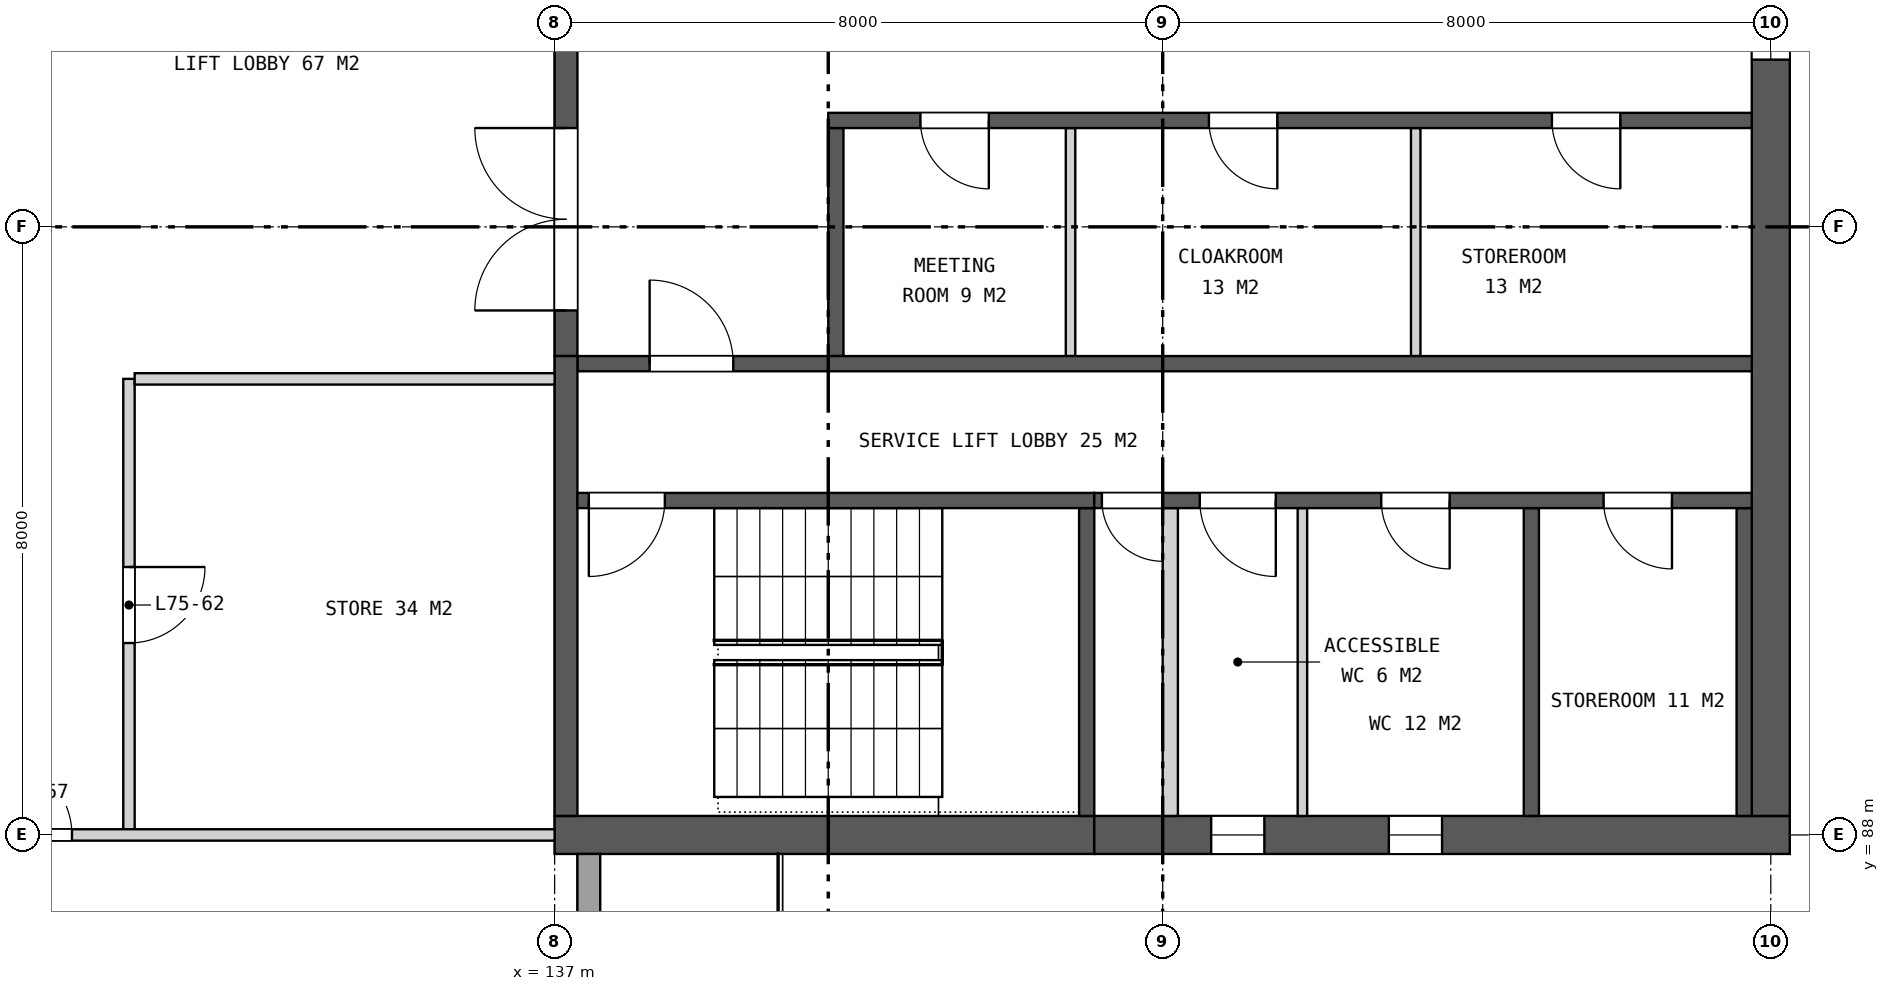
"""IFC4 building model, lengths in metres.
Left out: names, types, materials, properties, quantities, classifications, styles, units other than length and angle.
Written with IfcOpenShell. Run it as: python <this file> out.ifc"""

import sys

from ifc_helpers import new_model, si_unit, direction, frame, frame_2d, origin, place, context, subcontext, project, spatial, rectangle, extrude, element, fill, save


model = new_model("IFC4")
c1 = context("Model", 3, precision=1e-05, world=origin(), true_north=direction((0.0, 1.0)))
c2 = subcontext(c1, "Body", "Model", "MODEL_VIEW")
j1 = project(units=[si_unit("LENGTHUNIT", "METRE"), si_unit("PLANEANGLEUNIT", "RADIAN")], contexts=[c1])
p1 = place(None, origin())
s1 = spatial("IfcSite", under=j1, at=p1, CompositionType="ELEMENT")
p2 = place(p1, origin())
s2 = spatial("IfcBuilding", under=s1, at=p2, CompositionType="ELEMENT")
p3 = place(p2, frame((0.0, 0.0, 344.9)))
s3 = spatial("IfcBuildingStorey", under=s2, at=p3, CompositionType="ELEMENT", Elevation=344.9)
p4 = place(p3, frame((137.0, 88.0, 0.0), z_axis=(0.0, 0.0, 1.0), x_axis=(1.0, 0.0, 0.0)))
e1 = element("IfcWall", 1, at=p4, inside=s3, PredefinedType="SHEAR", context=c2, shape_type="SweptSolid", body=[
    extrude(rectangle(XDim=7.1, YDim=0.5, at=frame_2d((3.55, 0.0))), origin(), (0.0, 0.0, 1.0), 4.2),
])
p5 = place(p3, frame((144.1, 88.0, 0.0), z_axis=(0.0, 0.0, 1.0), x_axis=(1.0, 0.0, 0.0)))
e2 = element("IfcWall", 2, at=p5, inside=s3, PredefinedType="SHEAR", context=c2, shape_type="SweptSolid", body=[
    extrude(rectangle(XDim=9.15, YDim=0.5, at=frame_2d((4.575, 0.0))), origin(), (0.0, 0.0, 1.0), 4.2),
])
p6 = place(p5, frame((1.538, 0.0, 1.5)))
e3 = element("IfcOpeningElement", 3, at=p6, cuts=e2, PredefinedType="OPENING", context=c2, shape_type="SweptSolid", body=[
    extrude(rectangle(XDim=0.7, YDim=0.9, at=frame_2d((0.35, 0.45))), frame((0.0, 0.26, 0.0), z_axis=(0.0, -1.0, 0.0), x_axis=(1.0, 0.0, 0.0)), (0.0, 0.0, 1.0), 0.52),
])
p7 = place(p5, frame((3.875, 0.0, 1.5)))
e4 = element("IfcOpeningElement", 4, at=p7, cuts=e2, PredefinedType="OPENING", context=c2, shape_type="SweptSolid", body=[
    extrude(rectangle(XDim=0.7, YDim=0.9, at=frame_2d((0.35, 0.45))), frame((0.0, 0.26, 0.0), z_axis=(0.0, -1.0, 0.0), x_axis=(1.0, 0.0, 0.0)), (0.0, 0.0, 1.0), 0.52),
])
p8 = place(p3, frame((153.0, 88.25, 0.0), z_axis=(0.0, 0.0, 1.0), x_axis=(0.0, 1.0, 0.0)))
e5 = element("IfcWall", 5, at=p8, inside=s3, PredefinedType="SHEAR", context=c2, shape_type="SweptSolid", body=[
    extrude(rectangle(XDim=23.5, YDim=0.5, at=frame_2d((11.75, 0.0))), origin(), (0.0, 0.0, 1.0), 4.2),
])
p9 = place(p8, frame((9.95, 0.0, 0.15)))
e6 = element("IfcOpeningElement", 6, at=p9, cuts=e5, PredefinedType="OPENING", context=c2, shape_type="SweptSolid", body=[
    extrude(rectangle(XDim=3.6, YDim=3.0, at=frame_2d((1.8, 1.5))), frame((0.0, 0.26, 0.0), z_axis=(0.0, -1.0, 0.0), x_axis=(1.0, 0.0, 0.0)), (0.0, 0.0, 1.0), 0.52),
])
p10 = place(p3, frame((137.15, 94.3, 0.0), z_axis=(0.0, 0.0, 1.0), x_axis=(0.0, 1.0, 0.0)))
e7 = element("IfcWall", 7, at=p10, inside=s3, PredefinedType="SHEAR", context=c2, shape_type="SweptSolid", body=[
    extrude(rectangle(XDim=11.4, YDim=0.3, at=frame_2d((5.7, 0.0))), origin(), (0.0, 0.0, 1.0), 4.2),
])
p11 = place(p10, frame((0.6, 0.0, 0.0)))
e8 = element("IfcOpeningElement", 8, at=p11, cuts=e7, PredefinedType="OPENING", context=c2, shape_type="SweptSolid", body=[
    extrude(rectangle(XDim=2.4, YDim=2.4, at=frame_2d((1.2, 1.2))), frame((0.0, 0.16, 0.0), z_axis=(0.0, -1.0, 0.0), x_axis=(1.0, 0.0, 0.0)), (0.0, 0.0, 1.0), 0.32),
])
p12 = place(p10, frame((4.5, 0.0, 0.0)))
e9 = element("IfcOpeningElement", 9, at=p12, cuts=e7, PredefinedType="OPENING", context=c2, shape_type="SweptSolid", body=[
    extrude(rectangle(XDim=2.4, YDim=2.4, at=frame_2d((1.2, 1.2))), frame((0.0, 0.16, 0.0), z_axis=(0.0, -1.0, 0.0), x_axis=(1.0, 0.0, 0.0)), (0.0, 0.0, 1.0), 0.32),
])
p13 = place(p10, frame((8.4, 0.0, 0.0)))
e10 = element("IfcOpeningElement", 10, at=p13, cuts=e7, PredefinedType="OPENING", context=c2, shape_type="SweptSolid", body=[
    extrude(rectangle(XDim=2.4, YDim=2.4, at=frame_2d((1.2, 1.2))), frame((0.0, 0.16, 0.0), z_axis=(0.0, -1.0, 0.0), x_axis=(1.0, 0.0, 0.0)), (0.0, 0.0, 1.0), 0.32),
])
p14 = place(p3, frame((140.7, 94.3, 0.0), z_axis=(0.0, 0.0, 1.0), x_axis=(0.0, 1.0, 0.0)))
e11 = element("IfcWall", 11, at=p14, inside=s3, PredefinedType="SHEAR", context=c2, shape_type="SweptSolid", body=[
    extrude(rectangle(XDim=3.0, YDim=0.2, at=frame_2d((1.5, 0.0))), origin(), (0.0, 0.0, 1.0), 4.2),
])
for number, where, z_axis, x_axis in (
    (12, (143.788, 94.3, 0.0), (0.0, 0.0, 1.0), (0.0, 1.0, 0.0)),
    (13, (148.329, 94.3, 0.0), (0.0, 0.0, 1.0), (0.0, 1.0, 0.0)),
):
    element("IfcWall", number, at=place(p3, frame(where, z_axis=z_axis, x_axis=x_axis)), inside=s3, PredefinedType="PARTITIONING", context=c2, shape_type="SweptSolid", body=[
        extrude(rectangle(XDim=3.0, YDim=0.125, at=frame_2d((1.5, 0.0))), origin(), (0.0, 0.0, 1.0), 4.2),
    ])
p15 = place(p3, frame((140.6, 97.4, 0.0), z_axis=(0.0, 0.0, 1.0), x_axis=(1.0, 0.0, 0.0)))
e14 = element("IfcWall", 14, at=p15, inside=s3, PredefinedType="SHEAR", context=c2, shape_type="SweptSolid", body=[
    extrude(rectangle(XDim=12.15, YDim=0.2, at=frame_2d((6.075, 0.0))), origin(), (0.0, 0.0, 1.0), 4.2),
])
p16 = place(p15, frame((1.212, 0.0, 0.0)))
e15 = element("IfcOpeningElement", 15, at=p16, cuts=e14, PredefinedType="OPENING", context=c2, shape_type="SweptSolid", body=[
    extrude(rectangle(XDim=0.9, YDim=2.1, at=frame_2d((0.45, 1.05))), frame((0.0, 0.11, 0.0), z_axis=(0.0, -1.0, 0.0), x_axis=(1.0, 0.0, 0.0)), (0.0, 0.0, 1.0), 0.22),
])
p17 = place(p15, frame((5.008, 0.0, 0.0)))
e16 = element("IfcOpeningElement", 16, at=p17, cuts=e14, PredefinedType="OPENING", context=c2, shape_type="SweptSolid", body=[
    extrude(rectangle(XDim=0.9, YDim=2.1, at=frame_2d((0.45, 1.05))), frame((0.0, 0.11, 0.0), z_axis=(0.0, -1.0, 0.0), x_axis=(1.0, 0.0, 0.0)), (0.0, 0.0, 1.0), 0.22),
])
p18 = place(p15, frame((9.521, 0.0, 0.0)))
e17 = element("IfcOpeningElement", 17, at=p18, cuts=e14, PredefinedType="OPENING", context=c2, shape_type="SweptSolid", body=[
    extrude(rectangle(XDim=0.9, YDim=2.1, at=frame_2d((0.45, 1.05))), frame((0.0, 0.11, 0.0), z_axis=(0.0, -1.0, 0.0), x_axis=(1.0, 0.0, 0.0)), (0.0, 0.0, 1.0), 0.22),
])
p19 = place(p3, frame((137.3, 94.2, 0.0), z_axis=(0.0, 0.0, 1.0), x_axis=(1.0, 0.0, 0.0)))
e18 = element("IfcWall", 18, at=p19, inside=s3, PredefinedType="SHEAR", context=c2, shape_type="SweptSolid", body=[
    extrude(rectangle(XDim=15.45, YDim=0.2, at=frame_2d((7.725, 0.0))), origin(), (0.0, 0.0, 1.0), 4.2),
])
p20 = place(p19, frame((0.95, 0.0, 0.0)))
e19 = element("IfcOpeningElement", 19, at=p20, cuts=e18, PredefinedType="OPENING", context=c2, shape_type="SweptSolid", body=[
    extrude(rectangle(XDim=1.1, YDim=2.1, at=frame_2d((0.55, 1.05))), frame((0.0, 0.11, 0.0), z_axis=(0.0, -1.0, 0.0), x_axis=(1.0, 0.0, 0.0)), (0.0, 0.0, 1.0), 0.22),
])
p21 = place(p3, frame((137.15, 88.25, 0.0), z_axis=(0.0, 0.0, 1.0), x_axis=(0.0, 1.0, 0.0)))
e20 = element("IfcWall", 20, at=p21, inside=s3, PredefinedType="SHEAR", context=c2, shape_type="SweptSolid", body=[
    extrude(rectangle(XDim=6.05, YDim=0.3, at=frame_2d((3.025, 0.0))), origin(), (0.0, 0.0, 1.0), 4.2),
])
for number, where, z_axis, x_axis in (
    (21, (144.0, 88.25, 0.0), (0.0, 0.0, 1.0), (0.0, 1.0, 0.0)),
    (22, (149.85, 88.25, 0.0), (0.0, 0.0, 1.0), (0.0, 1.0, 0.0)),
    (23, (152.65, 88.25, 0.0), (0.0, 0.0, 1.0), (0.0, 1.0, 0.0)),
):
    element("IfcWall", number, at=place(p3, frame(where, z_axis=z_axis, x_axis=x_axis)), inside=s3, PredefinedType="SHEAR", context=c2, shape_type="SweptSolid", body=[
        extrude(rectangle(XDim=4.05, YDim=0.2, at=frame_2d((2.025, 0.0))), origin(), (0.0, 0.0, 1.0), 4.2),
    ])
p22 = place(p3, frame((145.1, 88.25, 0.0), z_axis=(0.0, 0.0, 1.0), x_axis=(0.0, 1.0, 0.0)))
e24 = element("IfcWall", 24, at=p22, inside=s3, PredefinedType="PARTITIONING", context=c2, shape_type="SweptSolid", body=[
    extrude(rectangle(XDim=4.05, YDim=0.2, at=frame_2d((2.025, 0.0))), origin(), (0.0, 0.0, 1.0), 4.2),
])
p23 = place(p3, frame((146.838, 88.25, 0.0), z_axis=(0.0, 0.0, 1.0), x_axis=(0.0, 1.0, 0.0)))
e25 = element("IfcWall", 25, at=p23, inside=s3, PredefinedType="PARTITIONING", context=c2, shape_type="SweptSolid", body=[
    extrude(rectangle(XDim=4.05, YDim=0.125, at=frame_2d((2.025, 0.0))), origin(), (0.0, 0.0, 1.0), 4.2),
])
p24 = place(p3, frame((137.3, 92.4, 0.0), z_axis=(0.0, 0.0, 1.0), x_axis=(1.0, 0.0, 0.0)))
e26 = element("IfcWall", 26, at=p24, inside=s3, PredefinedType="SHEAR", context=c2, shape_type="SweptSolid", body=[
    extrude(rectangle(XDim=6.8, YDim=0.2, at=frame_2d((3.4, 0.0))), origin(), (0.0, 0.0, 1.0), 4.2),
])
p25 = place(p24, frame((0.15, 0.0, 0.0)))
e27 = element("IfcOpeningElement", 27, at=p25, cuts=e26, PredefinedType="OPENING", context=c2, shape_type="SweptSolid", body=[
    extrude(rectangle(XDim=1.0, YDim=2.1, at=frame_2d((0.5, 1.05))), frame((0.0, 0.11, 0.0), z_axis=(0.0, -1.0, 0.0), x_axis=(1.0, 0.0, 0.0)), (0.0, 0.0, 1.0), 0.22),
])
p26 = place(p3, frame((144.1, 92.4, 0.0), z_axis=(0.0, 0.0, 1.0), x_axis=(1.0, 0.0, 0.0)))
e28 = element("IfcWall", 28, at=p26, inside=s3, PredefinedType="SHEAR", context=c2, shape_type="SweptSolid", body=[
    extrude(rectangle(XDim=8.65, YDim=0.2, at=frame_2d((4.325, 0.0))), origin(), (0.0, 0.0, 1.0), 4.2),
])
p27 = place(p26, frame((0.1, 0.0, 0.0)))
e29 = element("IfcOpeningElement", 29, at=p27, cuts=e28, PredefinedType="OPENING", context=c2, shape_type="SweptSolid", body=[
    extrude(rectangle(XDim=0.8, YDim=2.1, at=frame_2d((0.4, 1.05))), frame((0.0, 0.11, 0.0), z_axis=(0.0, -1.0, 0.0), x_axis=(1.0, 0.0, 0.0)), (0.0, 0.0, 1.0), 0.22),
])
p28 = place(p26, frame((1.388, 0.0, 0.0)))
e30 = element("IfcOpeningElement", 30, at=p28, cuts=e28, PredefinedType="OPENING", context=c2, shape_type="SweptSolid", body=[
    extrude(rectangle(XDim=1.0, YDim=2.1, at=frame_2d((0.5, 1.05))), frame((0.0, 0.11, 0.0), z_axis=(0.0, -1.0, 0.0), x_axis=(1.0, 0.0, 0.0)), (0.0, 0.0, 1.0), 0.22),
])
p29 = place(p26, frame((3.775, 0.0, 0.0)))
e31 = element("IfcOpeningElement", 31, at=p29, cuts=e28, PredefinedType="OPENING", context=c2, shape_type="SweptSolid", body=[
    extrude(rectangle(XDim=0.9, YDim=2.1, at=frame_2d((0.45, 1.05))), frame((0.0, 0.11, 0.0), z_axis=(0.0, -1.0, 0.0), x_axis=(1.0, 0.0, 0.0)), (0.0, 0.0, 1.0), 0.22),
])
p30 = place(p26, frame((6.7, 0.0, 0.0)))
e32 = element("IfcOpeningElement", 32, at=p30, cuts=e28, PredefinedType="OPENING", context=c2, shape_type="SweptSolid", body=[
    extrude(rectangle(XDim=0.9, YDim=2.1, at=frame_2d((0.45, 1.05))), frame((0.0, 0.11, 0.0), z_axis=(0.0, -1.0, 0.0), x_axis=(1.0, 0.0, 0.0)), (0.0, 0.0, 1.0), 0.22),
])
p31 = place(p3, frame((137.45, 80.038, 0.0), z_axis=(0.0, 0.0, 1.0), x_axis=(0.0, 1.0, 0.0)))
e33 = element("IfcWall", 33, at=p31, inside=s3, PredefinedType="SOLIDWALL", context=c2, shape_type="SweptSolid", body=[
    extrude(rectangle(XDim=7.712, YDim=0.3, at=frame_2d((3.856, 0.0))), origin(), (0.0, 0.0, 1.0), 3.85),
])
p32 = place(p31, frame((2.762, 0.0, 0.0)))
e34 = element("IfcOpeningElement", 34, at=p32, cuts=e33, PredefinedType="OPENING", context=c2, shape_type="SweptSolid", body=[
    extrude(rectangle(XDim=2.4, YDim=2.4, at=frame_2d((1.2, 1.2))), frame((0.0, 0.16, 0.0), z_axis=(0.0, -1.0, 0.0), x_axis=(1.0, 0.0, 0.0)), (0.0, 0.0, 1.0), 0.32),
])
p33 = place(p3, frame((131.4, 88.075, 0.0), z_axis=(0.0, 0.0, 1.0), x_axis=(0.0, 1.0, 0.0)))
e35 = element("IfcWall", 35, at=p33, inside=s3, PredefinedType="PARTITIONING", context=c2, shape_type="SweptSolid", body=[
    extrude(rectangle(XDim=5.925, YDim=0.15, at=frame_2d((2.962, 0.0))), origin(), (0.0, 0.0, 1.0), 3.396),
])
p34 = place(p33, frame((2.45, 0.0, 0.0)))
e36 = element("IfcOpeningElement", 36, at=p34, cuts=e35, PredefinedType="OPENING", context=c2, shape_type="SweptSolid", body=[
    extrude(rectangle(XDim=1.0, YDim=2.1, at=frame_2d((0.5, 1.05))), frame((0.0, 0.085, 0.0), z_axis=(0.0, -1.0, 0.0), x_axis=(1.0, 0.0, 0.0)), (0.0, 0.0, 1.0), 0.17),
])
p35 = place(p3, frame((113.0, 88.0, 0.0), z_axis=(0.0, 0.0, 1.0), x_axis=(1.0, 0.0, 0.0)))
e37 = element("IfcWall", 37, at=p35, inside=s3, PredefinedType="PARTITIONING", context=c2, shape_type="SweptSolid", body=[
    extrude(rectangle(XDim=24.0, YDim=0.15, at=frame_2d((12.0, 0.0))), origin(), (0.0, 0.0, 1.0), 3.396),
])
p36 = place(p35, frame((6.25, 0.0, 0.0)))
e38 = element("IfcOpeningElement", 38, at=p36, cuts=e37, PredefinedType="OPENING", context=c2, shape_type="SweptSolid", body=[
    extrude(rectangle(XDim=1.0, YDim=2.1, at=frame_2d((0.5, 1.05))), frame((0.0, 0.085, 0.0), z_axis=(0.0, -1.0, 0.0), x_axis=(1.0, 0.0, 0.0)), (0.0, 0.0, 1.0), 0.17),
])
p37 = place(p35, frame((16.65, 0.0, 0.0)))
e39 = element("IfcOpeningElement", 39, at=p37, cuts=e37, PredefinedType="OPENING", context=c2, shape_type="SweptSolid", body=[
    extrude(rectangle(XDim=1.0, YDim=2.1, at=frame_2d((0.5, 1.05))), frame((0.0, 0.085, 0.0), z_axis=(0.0, -1.0, 0.0), x_axis=(1.0, 0.0, 0.0)), (0.0, 0.0, 1.0), 0.17),
])
p38 = place(p3, frame((131.475, 94.0, 0.0), z_axis=(0.0, 0.0, 1.0), x_axis=(1.0, 0.0, 0.0)))
e40 = element("IfcWall", 40, at=p38, inside=s3, PredefinedType="PARTITIONING", context=c2, shape_type="SweptSolid", body=[
    extrude(rectangle(XDim=5.525, YDim=0.15, at=frame_2d((2.762, 0.0))), origin(), (0.0, 0.0, 1.0), 3.396),
])
p39 = place(p6, origin())
e41 = element("IfcWindow", 41, at=p39, inside=s3, PartitioningType="SINGLE_PANEL", PredefinedType="WINDOW", context=c2, shape_type="SweptSolid", body=[
    extrude(rectangle(XDim=0.7, YDim=0.9, at=frame_2d((0.35, 0.45))), frame((0.0, 0.03, 0.0), z_axis=(0.0, -1.0, 0.0), x_axis=(1.0, 0.0, 0.0)), (0.0, 0.0, 1.0), 0.06),
])
fill(e3, e41)
p40 = place(p7, origin())
e42 = element("IfcWindow", 42, at=p40, inside=s3, PartitioningType="SINGLE_PANEL", PredefinedType="WINDOW", context=c2, shape_type="SweptSolid", body=[
    extrude(rectangle(XDim=0.7, YDim=0.9, at=frame_2d((0.35, 0.45))), frame((0.0, 0.03, 0.0), z_axis=(0.0, -1.0, 0.0), x_axis=(1.0, 0.0, 0.0)), (0.0, 0.0, 1.0), 0.06),
])
fill(e4, e42)
p41 = place(p9, origin())
e43 = element("IfcWindow", 43, at=p41, inside=s3, PartitioningType="SINGLE_PANEL", PredefinedType="WINDOW", context=c2, shape_type="SweptSolid", body=[
    extrude(rectangle(XDim=3.6, YDim=3.0, at=frame_2d((1.8, 1.5))), frame((0.0, 0.03, 0.0), z_axis=(0.0, -1.0, 0.0), x_axis=(1.0, 0.0, 0.0)), (0.0, 0.0, 1.0), 0.06),
])
fill(e6, e43)
p42 = place(p11, origin())
e44 = element("IfcDoor", 44, at=p42, inside=s3, OperationType="DOUBLE_DOOR_SINGLE_SWING", PredefinedType="DOOR", context=c2, shape_type="SweptSolid", body=[
    extrude(rectangle(XDim=2.4, YDim=2.4, at=frame_2d((1.2, 1.2))), frame((0.0, 0.025, 0.0), z_axis=(0.0, -1.0, 0.0), x_axis=(1.0, 0.0, 0.0)), (0.0, 0.0, 1.0), 0.05),
])
fill(e8, e44)
p43 = place(p16, frame((0.9, 0.0, 0.0), z_axis=(0.0, 0.0, 1.0), x_axis=(-1.0, 0.0, 0.0)))
e45 = element("IfcDoor", 45, at=p43, inside=s3, OperationType="SINGLE_SWING_LEFT", PredefinedType="DOOR", context=c2, shape_type="SweptSolid", body=[
    extrude(rectangle(XDim=0.9, YDim=2.1, at=frame_2d((0.45, 1.05))), frame((0.0, 0.025, 0.0), z_axis=(0.0, -1.0, 0.0), x_axis=(1.0, 0.0, 0.0)), (0.0, 0.0, 1.0), 0.05),
])
fill(e15, e45)
p44 = place(p17, frame((0.9, 0.0, 0.0), z_axis=(0.0, 0.0, 1.0), x_axis=(-1.0, 0.0, 0.0)))
e46 = element("IfcDoor", 46, at=p44, inside=s3, OperationType="SINGLE_SWING_LEFT", PredefinedType="DOOR", context=c2, shape_type="SweptSolid", body=[
    extrude(rectangle(XDim=0.9, YDim=2.1, at=frame_2d((0.45, 1.05))), frame((0.0, 0.025, 0.0), z_axis=(0.0, -1.0, 0.0), x_axis=(1.0, 0.0, 0.0)), (0.0, 0.0, 1.0), 0.05),
])
fill(e16, e46)
p45 = place(p18, frame((0.9, 0.0, 0.0), z_axis=(0.0, 0.0, 1.0), x_axis=(-1.0, 0.0, 0.0)))
e47 = element("IfcDoor", 47, at=p45, inside=s3, OperationType="SINGLE_SWING_LEFT", PredefinedType="DOOR", context=c2, shape_type="SweptSolid", body=[
    extrude(rectangle(XDim=0.9, YDim=2.1, at=frame_2d((0.45, 1.05))), frame((0.0, 0.025, 0.0), z_axis=(0.0, -1.0, 0.0), x_axis=(1.0, 0.0, 0.0)), (0.0, 0.0, 1.0), 0.05),
])
fill(e17, e47)
p46 = place(p20, origin())
e48 = element("IfcDoor", 48, at=p46, inside=s3, OperationType="SINGLE_SWING_LEFT", PredefinedType="DOOR", context=c2, shape_type="SweptSolid", body=[
    extrude(rectangle(XDim=1.1, YDim=2.1, at=frame_2d((0.55, 1.05))), frame((0.0, 0.025, 0.0), z_axis=(0.0, -1.0, 0.0), x_axis=(1.0, 0.0, 0.0)), (0.0, 0.0, 1.0), 0.05),
])
fill(e19, e48)
p47 = place(p25, frame((1.0, 0.0, 0.0), z_axis=(0.0, 0.0, 1.0), x_axis=(-1.0, 0.0, 0.0)))
e49 = element("IfcDoor", 49, at=p47, inside=s3, OperationType="SINGLE_SWING_RIGHT", PredefinedType="DOOR", context=c2, shape_type="SweptSolid", body=[
    extrude(rectangle(XDim=1.0, YDim=2.1, at=frame_2d((0.5, 1.05))), frame((0.0, 0.025, 0.0), z_axis=(0.0, -1.0, 0.0), x_axis=(1.0, 0.0, 0.0)), (0.0, 0.0, 1.0), 0.05),
])
fill(e27, e49)
p48 = place(p27, frame((0.8, 0.0, 0.0), z_axis=(0.0, 0.0, 1.0), x_axis=(-1.0, 0.0, 0.0)))
e50 = element("IfcDoor", 50, at=p48, inside=s3, OperationType="SINGLE_SWING_LEFT", PredefinedType="DOOR", context=c2, shape_type="SweptSolid", body=[
    extrude(rectangle(XDim=0.8, YDim=2.1, at=frame_2d((0.4, 1.05))), frame((0.0, 0.025, 0.0), z_axis=(0.0, -1.0, 0.0), x_axis=(1.0, 0.0, 0.0)), (0.0, 0.0, 1.0), 0.05),
])
fill(e29, e50)
p49 = place(p28, frame((1.0, 0.0, 0.0), z_axis=(0.0, 0.0, 1.0), x_axis=(-1.0, 0.0, 0.0)))
e51 = element("IfcDoor", 51, at=p49, inside=s3, OperationType="SINGLE_SWING_LEFT", PredefinedType="DOOR", context=c2, shape_type="SweptSolid", body=[
    extrude(rectangle(XDim=1.0, YDim=2.1, at=frame_2d((0.5, 1.05))), frame((0.0, 0.025, 0.0), z_axis=(0.0, -1.0, 0.0), x_axis=(1.0, 0.0, 0.0)), (0.0, 0.0, 1.0), 0.05),
])
fill(e30, e51)
p50 = place(p29, frame((0.9, 0.0, 0.0), z_axis=(0.0, 0.0, 1.0), x_axis=(-1.0, 0.0, 0.0)))
e52 = element("IfcDoor", 52, at=p50, inside=s3, OperationType="SINGLE_SWING_LEFT", PredefinedType="DOOR", context=c2, shape_type="SweptSolid", body=[
    extrude(rectangle(XDim=0.9, YDim=2.1, at=frame_2d((0.45, 1.05))), frame((0.0, 0.025, 0.0), z_axis=(0.0, -1.0, 0.0), x_axis=(1.0, 0.0, 0.0)), (0.0, 0.0, 1.0), 0.05),
])
fill(e31, e52)
p51 = place(p30, frame((0.9, 0.0, 0.0), z_axis=(0.0, 0.0, 1.0), x_axis=(-1.0, 0.0, 0.0)))
e53 = element("IfcDoor", 53, at=p51, inside=s3, OperationType="SINGLE_SWING_LEFT", PredefinedType="DOOR", context=c2, shape_type="SweptSolid", body=[
    extrude(rectangle(XDim=0.9, YDim=2.1, at=frame_2d((0.45, 1.05))), frame((0.0, 0.025, 0.0), z_axis=(0.0, -1.0, 0.0), x_axis=(1.0, 0.0, 0.0)), (0.0, 0.0, 1.0), 0.05),
])
fill(e32, e53)
p52 = place(p37, origin())
e54 = element("IfcDoor", 54, at=p52, inside=s3, OperationType="SINGLE_SWING_LEFT", PredefinedType="DOOR", context=c2, shape_type="SweptSolid", body=[
    extrude(rectangle(XDim=1.0, YDim=2.1, at=frame_2d((0.5, 1.05))), frame((0.0, 0.025, 0.0), z_axis=(0.0, -1.0, 0.0), x_axis=(1.0, 0.0, 0.0)), (0.0, 0.0, 1.0), 0.05),
])
fill(e39, e54)
p53 = place(p34, frame((1.0, 0.0, 0.0), z_axis=(0.0, 0.0, 1.0), x_axis=(-1.0, 0.0, 0.0)))
e55 = element("IfcDoor", 55, at=p53, inside=s3, OperationType="SINGLE_SWING_LEFT", PredefinedType="DOOR", context=c2, shape_type="SweptSolid", body=[
    extrude(rectangle(XDim=1.0, YDim=2.1, at=frame_2d((0.5, 1.05))), frame((0.0, 0.025, 0.0), z_axis=(0.0, -1.0, 0.0), x_axis=(1.0, 0.0, 0.0)), (0.0, 0.0, 1.0), 0.05),
])
fill(e36, e55)
save(model, sys.argv[1])
